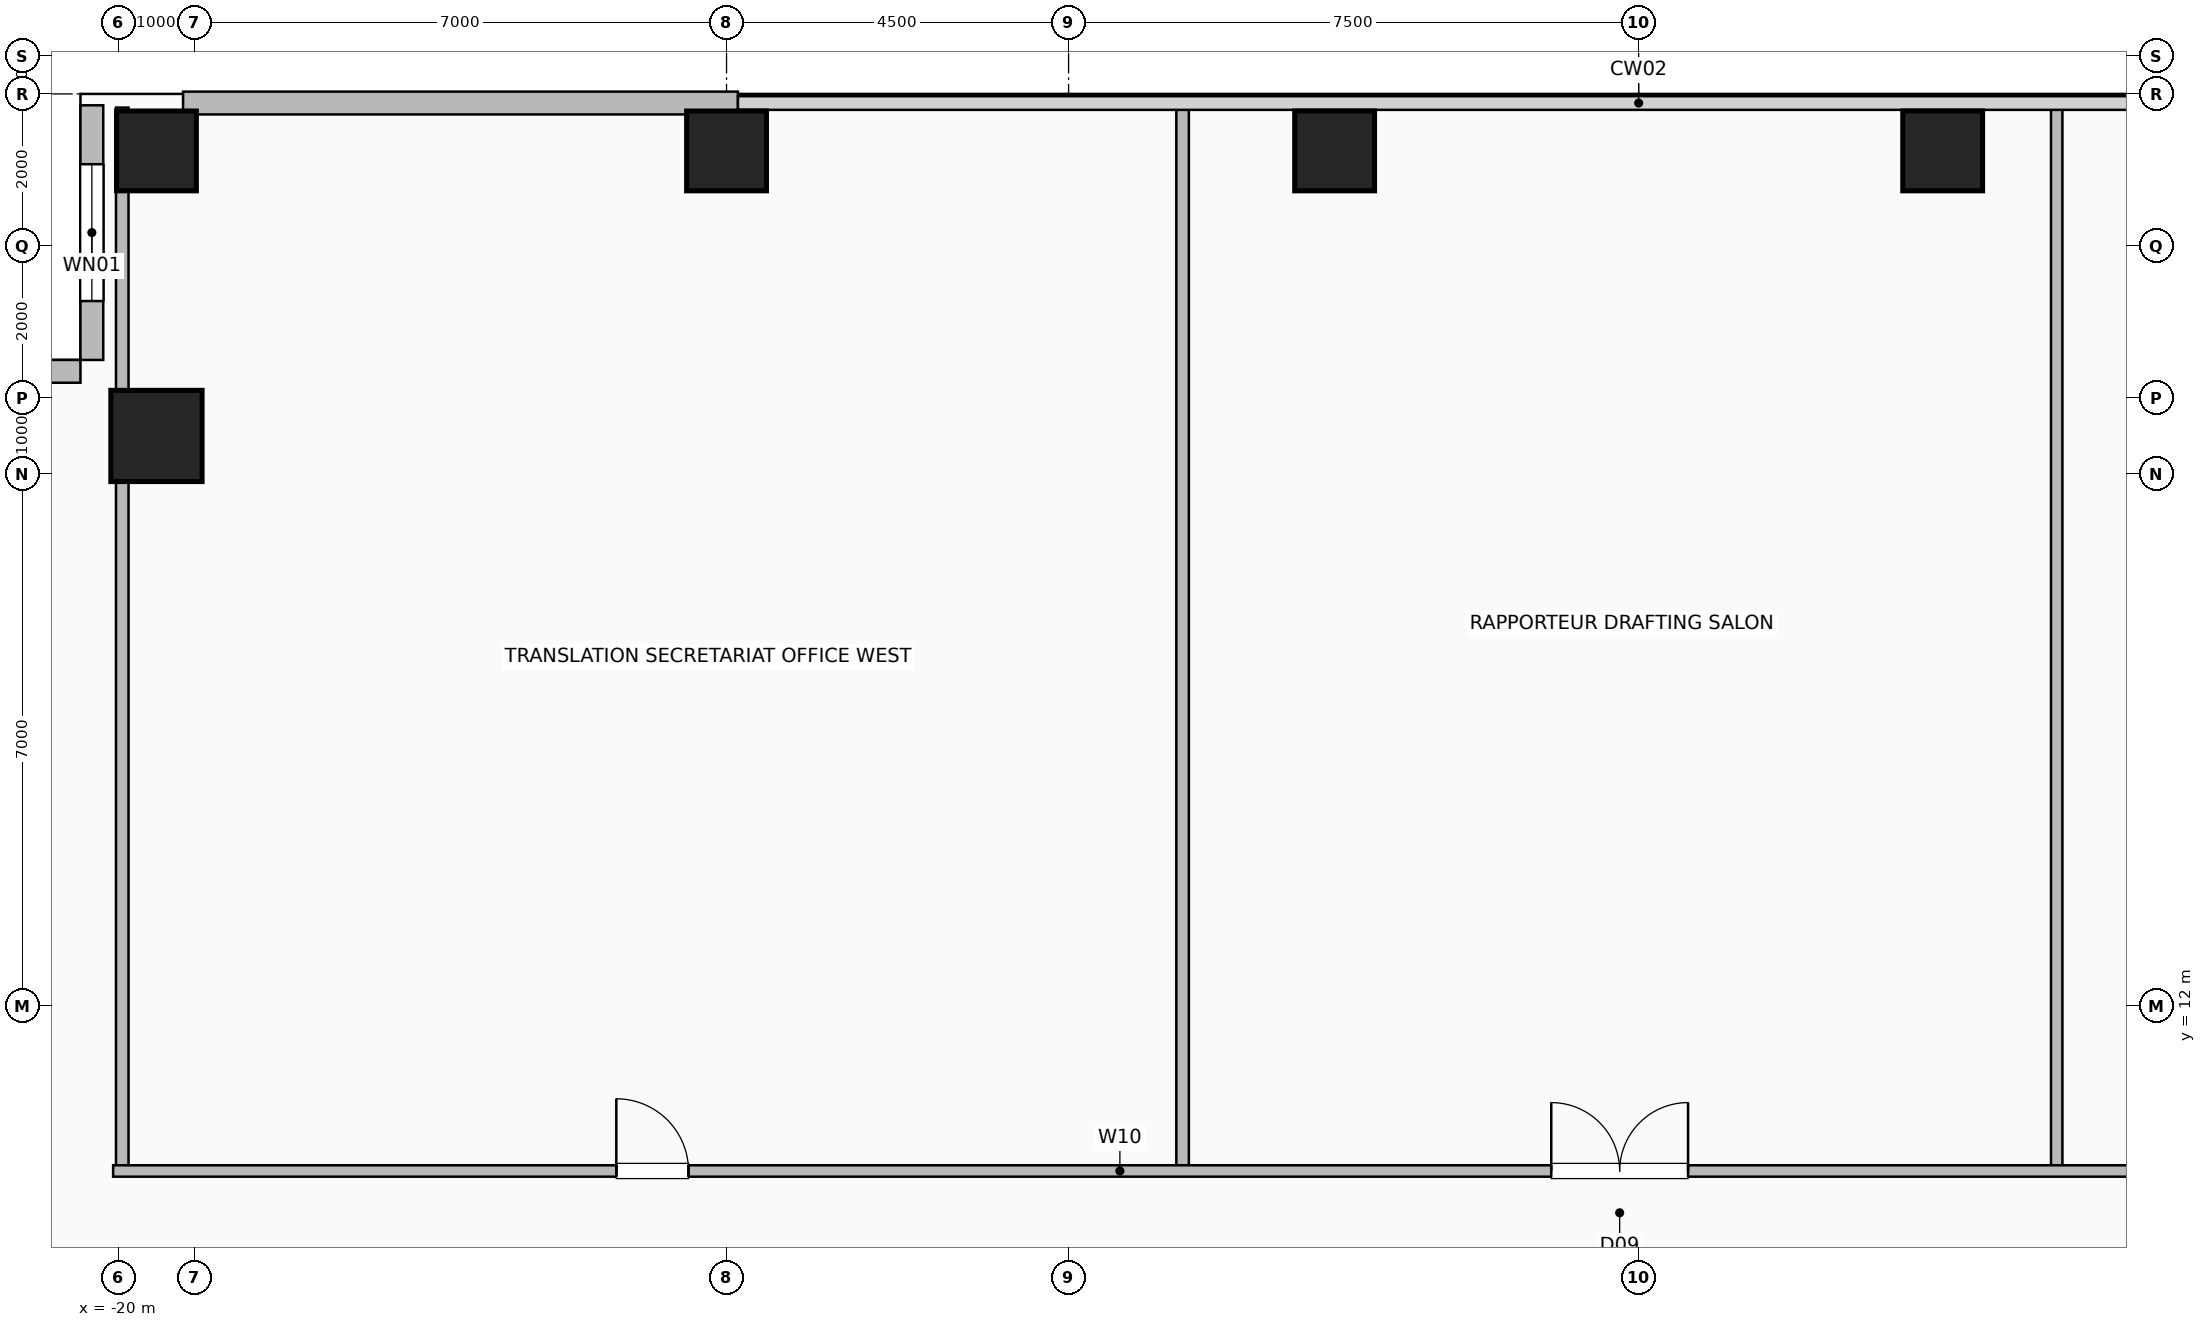
"""IFC4 building model, lengths in metres.
Left out: names, types, materials, properties, quantities, classifications, styles, units other than length and angle.
Written with IfcOpenShell. Run it as: python <this file> out.ifc"""

import sys

from ifc_helpers import new_model, si_unit, direction, frame, frame_2d, origin, origin_2d, place, context, subcontext, project, spatial, rectangle, hollow_rectangle, extrude, element, fill, save


model = new_model("IFC4")
c1 = context("Model", 3, precision=1e-05, world=origin(), true_north=direction((0.0, 1.0)))
c2 = subcontext(c1, "Body", "Model", "MODEL_VIEW")
j1 = project(units=[si_unit("LENGTHUNIT", "METRE"), si_unit("PLANEANGLEUNIT", "RADIAN")], contexts=[c1])
p1 = place(None, origin())
s1 = spatial("IfcSite", under=j1, at=p1, CompositionType="ELEMENT")
p2 = place(p1, origin())
s2 = spatial("IfcBuilding", under=s1, at=p2, CompositionType="ELEMENT")
p3 = place(p2, frame((0.0, 0.0, 44.5)))
s3 = spatial("IfcBuildingStorey", under=s2, at=p3, CompositionType="ELEMENT", Elevation=44.5)
for number, where, z_axis, x_axis in (
    (1, (-19.5, 23.25, 0.0), (0.0, 0.0, 1.0), (1.0, 0.0, 0.0)),
    (2, (-12.0, 23.25, 0.0), (0.0, 0.0, 1.0), (1.0, 0.0, 0.0)),
    (3, (-4.0, 23.25, 0.0), (0.0, 0.0, 1.0), (1.0, 0.0, 0.0)),
    (4, (4.0, 23.25, 0.0), (0.0, 0.0, 1.0), (1.0, 0.0, 0.0)),
):
    element("IfcColumn", number, at=place(p3, frame(where, z_axis=z_axis, x_axis=x_axis)), inside=s3, PredefinedType="COLUMN", context=c2, shape_type="SweptSolid", body=[
        extrude(hollow_rectangle(XDim=1.05, YDim=1.05, WallThickness=0.05, at=origin_2d()), origin(), (0.0, 0.0, 1.0), 3.5),
    ])
p4 = place(p3, frame((-19.5, 19.5, 0.0), z_axis=(0.0, 0.0, 1.0), x_axis=(1.0, 0.0, 0.0)))
e5 = element("IfcColumn", 5, at=p4, inside=s3, PredefinedType="COLUMN", context=c2, shape_type="SweptSolid", body=[
    extrude(hollow_rectangle(XDim=1.2, YDim=1.2, WallThickness=0.055, at=origin_2d()), origin(), (0.0, 0.0, 1.0), 3.5),
])
p5 = place(p3, frame((-19.15, 23.88, 0.0), z_axis=(0.0, 0.0, 1.0), x_axis=(1.0, 0.0, 0.0)))
e6 = element("IfcWall", 6, at=p5, inside=s3, PredefinedType="SOLIDWALL", context=c2, shape_type="SweptSolid", body=[
    extrude(rectangle(XDim=7.3, YDim=0.3, at=frame_2d((3.65, 0.0))), origin(), (0.0, 0.0, 1.0), 3.25),
])
p6 = place(p3, frame((-20.35, 23.85, 0.0), z_axis=(0.0, 0.0, 1.0), x_axis=(0.0, -1.0, 0.0)))
e7 = element("IfcWall", 7, at=p6, inside=s3, PredefinedType="SOLIDWALL", context=c2, shape_type="SweptSolid", body=[
    extrude(rectangle(XDim=3.35, YDim=0.3, at=frame_2d((1.675, 0.0))), origin(), (0.0, 0.0, 1.0), 3.25),
])
p7 = place(p6, frame((0.775, 0.0, 0.9)))
e8 = element("IfcOpeningElement", 8, at=p7, cuts=e7, PredefinedType="OPENING", context=c2, shape_type="SweptSolid", body=[
    extrude(rectangle(XDim=1.8, YDim=1.8, at=frame_2d((0.9, 0.9))), frame((0.0, 0.16, 0.0), z_axis=(0.0, -1.0, 0.0), x_axis=(1.0, 0.0, 0.0)), (0.0, 0.0, 1.0), 0.32),
])
p8 = place(p3, frame((-23.85, 20.35, 0.0), z_axis=(0.0, 0.0, 1.0), x_axis=(1.0, 0.0, 0.0)))
e9 = element("IfcWall", 9, at=p8, inside=s3, PredefinedType="SOLIDWALL", context=c2, shape_type="SweptSolid", body=[
    extrude(rectangle(XDim=3.35, YDim=0.3, at=frame_2d((1.675, 0.0))), origin(), (0.0, 0.0, 1.0), 3.25),
])
for number, where, z_axis, x_axis in (
    (10, (-19.95, 9.83, 0.0), (0.0, 0.0, 1.0), (0.0, 1.0, 0.0)),
    (11, (-6.0, 9.83, 0.0), (0.0, 0.0, 1.0), (0.0, 1.0, 0.0)),
):
    element("IfcWall", number, at=place(p3, frame(where, z_axis=z_axis, x_axis=x_axis)), inside=s3, PredefinedType="PLUMBINGWALL", context=c2, shape_type="SweptSolid", body=[
        extrude(rectangle(XDim=13.99, YDim=0.165, at=frame_2d((6.995, 0.0))), origin(), (0.0, 0.0, 1.0), 3.25),
    ])
p9 = place(p3, frame((5.5, 9.83, 0.0), z_axis=(0.0, 0.0, 1.0), x_axis=(0.0, 1.0, 0.0)))
e12 = element("IfcWall", 12, at=p9, inside=s3, PredefinedType="PARTITIONING", context=c2, shape_type="SweptSolid", body=[
    extrude(rectangle(XDim=13.99, YDim=0.15, at=frame_2d((6.995, 0.0))), origin(), (0.0, 0.0, 1.0), 3.25),
])
p10 = place(p3, frame((-20.07, 9.83, 0.0), z_axis=(0.0, 0.0, 1.0), x_axis=(1.0, 0.0, 0.0)))
e13 = element("IfcWall", 13, at=p10, inside=s3, PredefinedType="PARTITIONING", context=c2, shape_type="SweptSolid", body=[
    extrude(rectangle(XDim=40.14, YDim=0.15, at=frame_2d((20.07, 0.0))), origin(), (0.0, 0.0, 1.0), 3.25),
])
p11 = place(p10, frame((6.62, 0.0, 0.0)))
e14 = element("IfcOpeningElement", 14, at=p11, cuts=e13, PredefinedType="OPENING", context=c2, shape_type="SweptSolid", body=[
    extrude(rectangle(XDim=0.95, YDim=2.06, at=frame_2d((0.475, 1.03))), frame((0.0, 0.085, 0.0), z_axis=(0.0, -1.0, 0.0), x_axis=(1.0, 0.0, 0.0)), (0.0, 0.0, 1.0), 0.17),
])
p12 = place(p10, frame((18.92, 0.0, 0.0)))
e15 = element("IfcOpeningElement", 15, at=p12, cuts=e13, PredefinedType="OPENING", context=c2, shape_type="SweptSolid", body=[
    extrude(rectangle(XDim=1.8, YDim=2.08, at=frame_2d((0.9, 1.04))), frame((0.0, 0.085, 0.0), z_axis=(0.0, -1.0, 0.0), x_axis=(1.0, 0.0, 0.0)), (0.0, 0.0, 1.0), 0.17),
])
p13 = place(p10, frame((29.595, 0.0, 0.0)))
e16 = element("IfcOpeningElement", 16, at=p13, cuts=e13, PredefinedType="OPENING", context=c2, shape_type="SweptSolid", body=[
    extrude(rectangle(XDim=0.95, YDim=2.06, at=frame_2d((0.475, 1.03))), frame((0.0, 0.085, 0.0), z_axis=(0.0, -1.0, 0.0), x_axis=(1.0, 0.0, 0.0)), (0.0, 0.0, 1.0), 0.17),
])
p14 = place(p10, frame((35.42, 0.0, 0.0)))
e17 = element("IfcOpeningElement", 17, at=p14, cuts=e13, PredefinedType="OPENING", context=c2, shape_type="SweptSolid", body=[
    extrude(rectangle(XDim=0.85, YDim=2.05, at=frame_2d((0.425, 1.025))), frame((0.0, 0.085, 0.0), z_axis=(0.0, -1.0, 0.0), x_axis=(1.0, 0.0, 0.0)), (0.0, 0.0, 1.0), 0.17),
])
p15 = place(p10, frame((38.095, 0.0, 0.0)))
e18 = element("IfcOpeningElement", 18, at=p15, cuts=e13, PredefinedType="OPENING", context=c2, shape_type="SweptSolid", body=[
    extrude(rectangle(XDim=0.95, YDim=2.06, at=frame_2d((0.475, 1.03))), frame((0.0, 0.085, 0.0), z_axis=(0.0, -1.0, 0.0), x_axis=(1.0, 0.0, 0.0)), (0.0, 0.0, 1.0), 0.17),
])
p16 = place(p7, origin())
e19 = element("IfcWindow", 19, at=p16, inside=s3, PartitioningType="SINGLE_PANEL", PredefinedType="WINDOW", context=c2, shape_type="SweptSolid", body=[
    extrude(rectangle(XDim=1.8, YDim=1.8, at=frame_2d((0.9, 0.9))), frame((0.0, 0.03, 0.0), z_axis=(0.0, -1.0, 0.0), x_axis=(1.0, 0.0, 0.0)), (0.0, 0.0, 1.0), 0.06),
])
fill(e8, e19)
p17 = place(p11, origin())
e20 = element("IfcDoor", 20, at=p17, inside=s3, OperationType="SINGLE_SWING_LEFT", PredefinedType="DOOR", context=c2, shape_type="SweptSolid", body=[
    extrude(rectangle(XDim=0.95, YDim=2.06, at=frame_2d((0.475, 1.03))), frame((0.0, 0.025, 0.0), z_axis=(0.0, -1.0, 0.0), x_axis=(1.0, 0.0, 0.0)), (0.0, 0.0, 1.0), 0.05),
])
fill(e14, e20)
p18 = place(p12, origin())
e21 = element("IfcDoor", 21, at=p18, inside=s3, OperationType="DOUBLE_DOOR_SINGLE_SWING", PredefinedType="DOOR", context=c2, shape_type="SweptSolid", body=[
    extrude(rectangle(XDim=1.8, YDim=2.08, at=frame_2d((0.9, 1.04))), frame((0.0, 0.025, 0.0), z_axis=(0.0, -1.0, 0.0), x_axis=(1.0, 0.0, 0.0)), (0.0, 0.0, 1.0), 0.05),
])
fill(e15, e21)
save(model, sys.argv[1])
